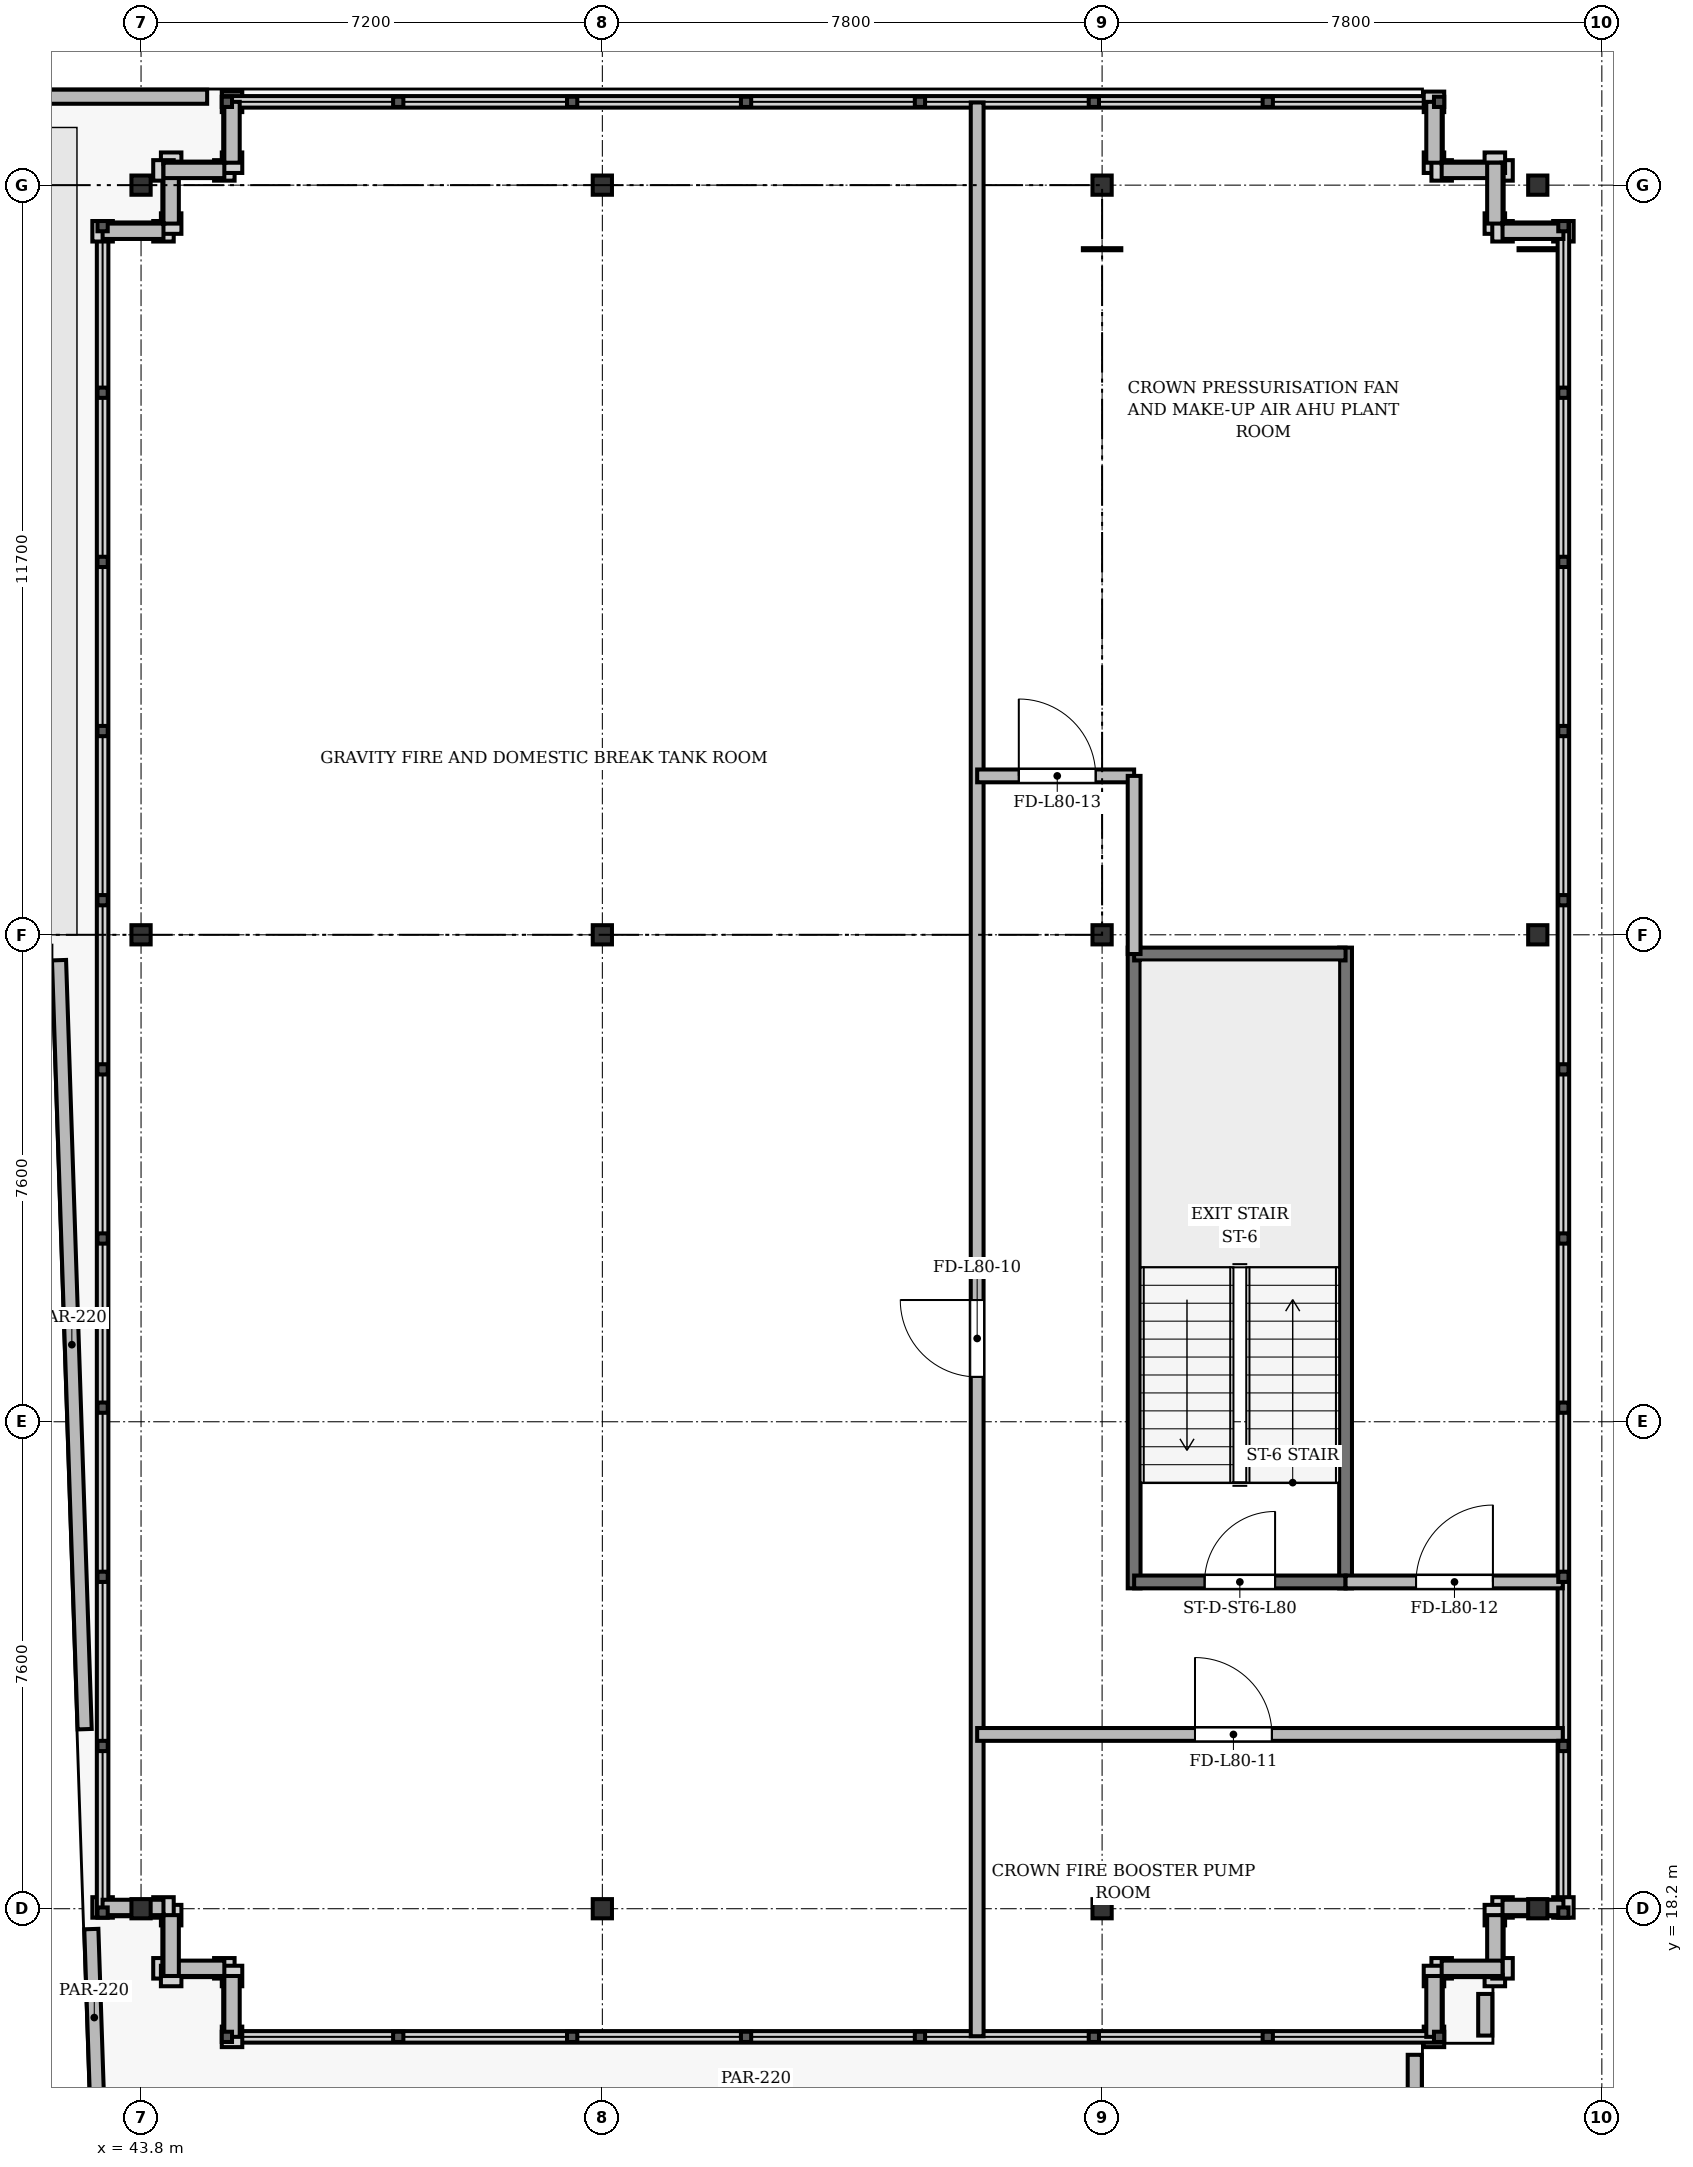
"""IFC4 building model, lengths in metres.
Left out: names, types, materials, properties, quantities, classifications, styles, units other than length and angle.
Written with IfcOpenShell. Run it as: python <this file> out.ifc"""

import sys

from ifc_helpers import new_model, si_unit, direction, frame, frame_2d, origin, origin_2d, place, context, subcontext, project, spatial, rectangle, i_section, extrude, source, transform, mapped, element, fill, save


model = new_model("IFC4")
c1 = context("Model", 3, precision=1e-05, world=origin(), true_north=direction((0.0, 1.0)))
c2 = subcontext(c1, "Body", "Model", "MODEL_VIEW")
j1 = project(units=[si_unit("LENGTHUNIT", "METRE"), si_unit("PLANEANGLEUNIT", "RADIAN")], contexts=[c1])
p1 = place(None, origin())
s1 = spatial("IfcSite", under=j1, at=p1, CompositionType="ELEMENT")
p2 = place(p1, origin())
s2 = spatial("IfcBuilding", under=s1, at=p2, CompositionType="ELEMENT")
p3 = place(p2, frame((0.0, 0.0, 307.9)))
s3 = spatial("IfcBuildingStorey", under=s2, at=p3, CompositionType="ELEMENT", Elevation=307.9)
m1 = source(origin(), c2, "Body", "SweptSolid", [
    extrude(i_section(OverallWidth=0.3, OverallDepth=0.3, WebThickness=0.015, FlangeThickness=0.024, at=origin_2d()), origin(), (0.0, 0.0, 1.0), 4.4),
])
for number, where, z_axis, x_axis in (
    (1, (43.8, 18.2, 0.0), (0.0, 0.0, 1.0), (1.0, 0.0, 0.0)),
    (2, (43.8, 33.4, 0.0), (0.0, 0.0, 1.0), (1.0, 0.0, 0.0)),
    (3, (43.8, 45.1, 0.0), (0.0, 0.0, 1.0), (1.0, 0.0, 0.0)),
    (4, (51.0, 18.2, 0.0), (0.0, 0.0, 1.0), (1.0, 0.0, 0.0)),
    (5, (51.0, 33.4, 0.0), (0.0, 0.0, 1.0), (1.0, 0.0, 0.0)),
    (6, (51.0, 45.1, 0.0), (0.0, 0.0, 1.0), (1.0, 0.0, 0.0)),
    (7, (58.8, 18.2, 0.0), (0.0, 0.0, 1.0), (1.0, 0.0, 0.0)),
    (8, (58.8, 33.4, 0.0), (0.0, 0.0, 1.0), (1.0, 0.0, 0.0)),
    (9, (58.8, 45.1, 0.0), (0.0, 0.0, 1.0), (1.0, 0.0, 0.0)),
    (10, (65.6, 18.2, 0.0), (0.0, 0.0, 1.0), (1.0, 0.0, 0.0)),
    (11, (65.6, 33.4, 0.0), (0.0, 0.0, 1.0), (1.0, 0.0, 0.0)),
    (12, (65.6, 45.1, 0.0), (0.0, 0.0, 1.0), (1.0, 0.0, 0.0)),
):
    element("IfcColumn", number, at=place(p3, frame(where, z_axis=z_axis, x_axis=x_axis)), inside=s3, PredefinedType="COLUMN", context=c2, shape_type="MappedRepresentation", body=[
        mapped(m1, transform((0.0, 0.0, 0.0), x_axis=(1.0, 0.0, 0.0), y_axis=(0.0, 1.0, 0.0), z_axis=(0.0, 0.0, 1.0), scale=1.0)),
    ])
for number, where, z_axis, x_axis in (
    (13, (45.1, 17.27, 0.0), (0.0, 0.0, 1.0), (-1.0, 0.0, 0.0)),
    (14, (44.27, 17.15, 0.0), (0.0, 0.0, 1.0), (0.0, 1.0, 0.0)),
):
    element("IfcWall", number, at=place(p3, frame(where, z_axis=z_axis, x_axis=x_axis)), inside=s3, PredefinedType="SOLIDWALL", context=c2, shape_type="SweptSolid", body=[
        extrude(rectangle(XDim=0.95, YDim=0.24, at=frame_2d((0.475, 0.0))), origin(), (0.0, 0.0, 1.0), 4.1),
    ])
for number, where, z_axis, x_axis in (
    (15, (44.15, 18.22, 0.0), (0.0, 0.0, 1.0), (-1.0, 0.0, 0.0)),
    (16, (43.2, 44.38, 0.0), (0.0, 0.0, 1.0), (1.0, 0.0, 0.0)),
    (17, (44.27, 44.5, 0.0), (0.0, 0.0, 1.0), (0.0, 1.0, 0.0)),
):
    element("IfcWall", number, at=place(p3, frame(where, z_axis=z_axis, x_axis=x_axis)), inside=s3, PredefinedType="SOLIDWALL", context=c2, shape_type="SweptSolid", body=[
        extrude(rectangle(XDim=0.95, YDim=0.24, at=frame_2d((0.475, 0.0))), origin(), (0.0, 0.0, 1.0), 4.1),
    ])
p4 = place(p3, frame((44.15, 45.33, 0.0), z_axis=(0.0, 0.0, 1.0), x_axis=(1.0, 0.0, 0.0)))
e18 = element("IfcWall", 18, at=p4, inside=s3, PredefinedType="SOLIDWALL", context=c2, shape_type="SweptSolid", body=[
    extrude(rectangle(XDim=0.95, YDim=0.24, at=frame_2d((0.475, 0.0))), origin(), (0.0, 0.0, 1.0), 4.1),
])
for number, where, z_axis, x_axis in (
    (19, (45.22, 45.45, 0.0), (0.0, 0.0, 1.0), (0.0, 1.0, 0.0)),
    (20, (63.98, 46.4, 0.0), (0.0, 0.0, 1.0), (0.0, -1.0, 0.0)),
    (21, (64.1, 45.33, 0.0), (0.0, 0.0, 1.0), (1.0, 0.0, 0.0)),
):
    element("IfcWall", number, at=place(p3, frame(where, z_axis=z_axis, x_axis=x_axis)), inside=s3, PredefinedType="SOLIDWALL", context=c2, shape_type="SweptSolid", body=[
        extrude(rectangle(XDim=0.95, YDim=0.24, at=frame_2d((0.475, 0.0))), origin(), (0.0, 0.0, 1.0), 4.1),
    ])
for number, where, z_axis, x_axis in (
    (22, (64.93, 45.45, 0.0), (0.0, 0.0, 1.0), (0.0, -1.0, 0.0)),
    (23, (65.05, 44.38, 0.0), (0.0, 0.0, 1.0), (1.0, 0.0, 0.0)),
    (24, (66.0, 18.22, 0.0), (0.0, 0.0, 1.0), (-1.0, 0.0, 0.0)),
):
    element("IfcWall", number, at=place(p3, frame(where, z_axis=z_axis, x_axis=x_axis)), inside=s3, PredefinedType="SOLIDWALL", context=c2, shape_type="SweptSolid", body=[
        extrude(rectangle(XDim=0.95, YDim=0.24, at=frame_2d((0.475, 0.0))), origin(), (0.0, 0.0, 1.0), 3.6),
    ])
p5 = place(p3, frame((64.93, 18.1, 0.0), z_axis=(0.0, 0.0, 1.0), x_axis=(0.0, -1.0, 0.0)))
e25 = element("IfcWall", 25, at=p5, inside=s3, PredefinedType="SOLIDWALL", context=c2, shape_type="SweptSolid", body=[
    extrude(rectangle(XDim=0.95, YDim=0.24, at=frame_2d((0.475, 0.0))), origin(), (0.0, 0.0, 1.0), 4.1),
])
for number, where, z_axis, x_axis in (
    (26, (65.05, 17.27, 0.0), (0.0, 0.0, 1.0), (-1.0, 0.0, 0.0)),
    (27, (63.98, 17.15, 0.0), (0.0, 0.0, 1.0), (0.0, -1.0, 0.0)),
    (28, (45.22, 16.2, 0.0), (0.0, 0.0, 1.0), (0.0, 1.0, 0.0)),
):
    element("IfcWall", number, at=place(p3, frame(where, z_axis=z_axis, x_axis=x_axis)), inside=s3, PredefinedType="SOLIDWALL", context=c2, shape_type="SweptSolid", body=[
        extrude(rectangle(XDim=0.95, YDim=0.24, at=frame_2d((0.475, 0.0))), origin(), (0.0, 0.0, 1.0), 4.1),
    ])
p6 = place(p3, frame((29.568, 46.48, 0.0), z_axis=(0.0, 0.0, 1.0), x_axis=(1.0, 0.0, 0.0)))
e29 = element("IfcWall", 29, at=p6, inside=s3, PredefinedType="PARAPET", context=c2, shape_type="SweptSolid", body=[
    extrude(rectangle(XDim=15.263, YDim=0.22, at=frame_2d((7.632, 0.0))), origin(), (0.0, 0.0, 1.0), 1.08),
])
p7 = place(p3, frame((63.68, 15.92, 0.0), z_axis=(0.0, 0.0, 1.0), x_axis=(0.0, -1.0, 0.0)))
e30 = element("IfcWall", 30, at=p7, inside=s3, PredefinedType="PARAPET", context=c2, shape_type="SweptSolid", body=[
    extrude(rectangle(XDim=0.8, YDim=0.22, at=frame_2d((0.4, 0.0))), origin(), (0.0, 0.0, 1.0), 1.08),
])
p8 = place(p3, frame((43.116, 15.12, 0.0), z_axis=(0.0, 0.0, 1.0), x_axis=(-0.033391303709, 0.999442354934, 0.0)))
e31 = element("IfcWall", 31, at=p8, inside=s3, PredefinedType="PARAPET", context=c2, shape_type="SweptSolid", body=[
    extrude(rectangle(XDim=2.764, YDim=0.22, at=frame_2d((1.382, 0.0))), origin(), (0.0, 0.0, 1.0), 1.08),
])
p9 = place(p3, frame((42.92, 21.002, 0.0), z_axis=(0.0, 0.0, 1.0), x_axis=(-0.033301291633, 0.999445358174, 0.0)))
e32 = element("IfcWall", 32, at=p9, inside=s3, PredefinedType="PARAPET", context=c2, shape_type="SweptSolid", body=[
    extrude(rectangle(XDim=12.009, YDim=0.22, at=frame_2d((6.004, 0.0))), origin(), (0.0, 0.0, 1.0), 1.08),
])
p10 = place(p3, frame((64.78, 16.87, 0.0), z_axis=(0.0, 0.0, 1.0), x_axis=(0.0, -1.0, 0.0)))
e33 = element("IfcWall", 33, at=p10, inside=s3, PredefinedType="PARAPET", context=c2, shape_type="SweptSolid", body=[
    extrude(rectangle(XDim=0.65, YDim=0.22, at=frame_2d((0.325, 0.0))), origin(), (0.0, 0.0, 1.0), 1.08),
])
for number, where, z_axis, x_axis in (
    (34, (59.3, 23.2, 0.0), (0.0, 0.0, 1.0), (0.0, 1.0, 0.0)),
    (35, (62.6, 23.2, 0.0), (0.0, 0.0, 1.0), (0.0, 1.0, 0.0)),
):
    element("IfcWall", number, at=place(p3, frame(where, z_axis=z_axis, x_axis=x_axis)), inside=s3, PredefinedType="SHEAR", context=c2, shape_type="SweptSolid", body=[
        extrude(rectangle(XDim=10.0, YDim=0.2, at=frame_2d((5.0, 0.0))), origin(), (0.0, 0.0, 1.0), 4.1),
    ])
p11 = place(p3, frame((59.3, 33.1, 0.0), z_axis=(0.0, 0.0, 1.0), x_axis=(1.0, 0.0, 0.0)))
e36 = element("IfcWall", 36, at=p11, inside=s3, PredefinedType="SHEAR", context=c2, shape_type="SweptSolid", body=[
    extrude(rectangle(XDim=3.3, YDim=0.2, at=frame_2d((1.65, 0.0))), origin(), (0.0, 0.0, 1.0), 4.1),
])
p12 = place(p3, frame((59.3, 23.3, 0.0), z_axis=(0.0, 0.0, 1.0), x_axis=(1.0, 0.0, 0.0)))
e37 = element("IfcWall", 37, at=p12, inside=s3, PredefinedType="SHEAR", context=c2, shape_type="SweptSolid", body=[
    extrude(rectangle(XDim=3.3, YDim=0.2, at=frame_2d((1.65, 0.0))), origin(), (0.0, 0.0, 1.0), 4.1),
])
p13 = place(p12, frame((1.1, 0.0, 0.0)))
e38 = element("IfcOpeningElement", 38, at=p13, cuts=e37, PredefinedType="OPENING", context=c2, shape_type="SweptSolid", body=[
    extrude(rectangle(XDim=1.1, YDim=2.15, at=frame_2d((0.55, 1.075))), frame((0.0, 0.11, 0.0), z_axis=(0.0, -1.0, 0.0), x_axis=(1.0, 0.0, 0.0)), (0.0, 0.0, 1.0), 0.22),
])
p14 = place(p3, frame((56.85, 16.21, 0.0), z_axis=(0.0, 0.0, 1.0), x_axis=(0.0, 1.0, 0.0)))
e39 = element("IfcWall", 39, at=p14, inside=s3, PredefinedType="PARTITIONING", context=c2, shape_type="SweptSolid", body=[
    extrude(rectangle(XDim=30.18, YDim=0.2, at=frame_2d((15.09, 0.0))), origin(), (0.0, 0.0, 1.0), 3.6),
])
p15 = place(p14, frame((10.29, 0.0, 0.0)))
e40 = element("IfcOpeningElement", 40, at=p15, cuts=e39, PredefinedType="OPENING", context=c2, shape_type="SweptSolid", body=[
    extrude(rectangle(XDim=1.2, YDim=2.15, at=frame_2d((0.6, 1.075))), frame((0.0, 0.11, 0.0), z_axis=(0.0, -1.0, 0.0), x_axis=(1.0, 0.0, 0.0)), (0.0, 0.0, 1.0), 0.22),
])
p16 = place(p3, frame((56.85, 20.92, 0.0), z_axis=(0.0, 0.0, 1.0), x_axis=(1.0, 0.0, 0.0)))
e41 = element("IfcWall", 41, at=p16, inside=s3, PredefinedType="PARTITIONING", context=c2, shape_type="SweptSolid", body=[
    extrude(rectangle(XDim=9.14, YDim=0.2, at=frame_2d((4.57, 0.0))), origin(), (0.0, 0.0, 1.0), 3.6),
])
p17 = place(p16, frame((3.4, 0.0, 0.0)))
e42 = element("IfcOpeningElement", 42, at=p17, cuts=e41, PredefinedType="OPENING", context=c2, shape_type="SweptSolid", body=[
    extrude(rectangle(XDim=1.2, YDim=2.15, at=frame_2d((0.6, 1.075))), frame((0.0, 0.11, 0.0), z_axis=(0.0, -1.0, 0.0), x_axis=(1.0, 0.0, 0.0)), (0.0, 0.0, 1.0), 0.22),
])
p18 = place(p3, frame((62.6, 23.3, 0.0), z_axis=(0.0, 0.0, 1.0), x_axis=(1.0, 0.0, 0.0)))
e43 = element("IfcWall", 43, at=p18, inside=s3, PredefinedType="PARTITIONING", context=c2, shape_type="SweptSolid", body=[
    extrude(rectangle(XDim=3.39, YDim=0.2, at=frame_2d((1.695, 0.0))), origin(), (0.0, 0.0, 1.0), 3.6),
])
p19 = place(p18, frame((1.1, 0.0, 0.0)))
e44 = element("IfcOpeningElement", 44, at=p19, cuts=e43, PredefinedType="OPENING", context=c2, shape_type="SweptSolid", body=[
    extrude(rectangle(XDim=1.2, YDim=2.15, at=frame_2d((0.6, 1.075))), frame((0.0, 0.11, 0.0), z_axis=(0.0, -1.0, 0.0), x_axis=(1.0, 0.0, 0.0)), (0.0, 0.0, 1.0), 0.22),
])
p20 = place(p3, frame((56.85, 35.88, 0.0), z_axis=(0.0, 0.0, 1.0), x_axis=(1.0, 0.0, 0.0)))
e45 = element("IfcWall", 45, at=p20, inside=s3, PredefinedType="PARTITIONING", context=c2, shape_type="SweptSolid", body=[
    extrude(rectangle(XDim=2.45, YDim=0.2, at=frame_2d((1.225, 0.0))), origin(), (0.0, 0.0, 1.0), 3.6),
])
p21 = place(p20, frame((0.65, 0.0, 0.0)))
e46 = element("IfcOpeningElement", 46, at=p21, cuts=e45, PredefinedType="OPENING", context=c2, shape_type="SweptSolid", body=[
    extrude(rectangle(XDim=1.2, YDim=2.15, at=frame_2d((0.6, 1.075))), frame((0.0, 0.11, 0.0), z_axis=(0.0, -1.0, 0.0), x_axis=(1.0, 0.0, 0.0)), (0.0, 0.0, 1.0), 0.22),
])
p22 = place(p3, frame((59.3, 33.1, 0.0), z_axis=(0.0, 0.0, 1.0), x_axis=(0.0, 1.0, 0.0)))
e47 = element("IfcWall", 47, at=p22, inside=s3, PredefinedType="PARTITIONING", context=c2, shape_type="SweptSolid", body=[
    extrude(rectangle(XDim=2.78, YDim=0.2, at=frame_2d((1.39, 0.0))), origin(), (0.0, 0.0, 1.0), 3.6),
])
m2 = source(origin(), c2, "Body", "SweptSolid", [
    extrude(rectangle(XDim=1.1, YDim=2.15, at=frame_2d((0.55, 1.075))), frame((0.0, 0.025, 0.0), z_axis=(0.0, -1.0, 0.0), x_axis=(1.0, 0.0, 0.0)), (0.0, 0.0, 1.0), 0.05),
])
p23 = place(p13, origin())
e48 = element("IfcDoor", 48, at=p23, inside=s3, OperationType="SINGLE_SWING_RIGHT", PredefinedType="DOOR", context=c2, shape_type="MappedRepresentation", body=[
    mapped(m2, transform((0.0, 0.0, 0.0), x_axis=(1.0, 0.0, 0.0), y_axis=(0.0, 1.0, 0.0), z_axis=(0.0, 0.0, 1.0), scale=1.0)),
])
fill(e38, e48)
m3 = source(origin(), c2, "Body", "SweptSolid", [
    extrude(rectangle(XDim=1.2, YDim=2.15, at=frame_2d((0.6, 1.075))), frame((0.0, 0.025, 0.0), z_axis=(0.0, -1.0, 0.0), x_axis=(1.0, 0.0, 0.0)), (0.0, 0.0, 1.0), 0.05),
])
p24 = place(p15, origin())
e49 = element("IfcDoor", 49, at=p24, inside=s3, OperationType="SINGLE_SWING_RIGHT", PredefinedType="DOOR", context=c2, shape_type="MappedRepresentation", body=[
    mapped(m3, transform((0.0, 0.0, 0.0), x_axis=(1.0, 0.0, 0.0), y_axis=(0.0, 1.0, 0.0), z_axis=(0.0, 0.0, 1.0), scale=1.0)),
])
fill(e40, e49)
p25 = place(p17, origin())
e50 = element("IfcDoor", 50, at=p25, inside=s3, OperationType="SINGLE_SWING_LEFT", PredefinedType="DOOR", context=c2, shape_type="MappedRepresentation", body=[
    mapped(m3, transform((0.0, 0.0, 0.0), x_axis=(1.0, 0.0, 0.0), y_axis=(0.0, 1.0, 0.0), z_axis=(0.0, 0.0, 1.0), scale=1.0)),
])
fill(e42, e50)
p26 = place(p19, origin())
e51 = element("IfcDoor", 51, at=p26, inside=s3, OperationType="SINGLE_SWING_RIGHT", PredefinedType="DOOR", context=c2, shape_type="MappedRepresentation", body=[
    mapped(m3, transform((0.0, 0.0, 0.0), x_axis=(1.0, 0.0, 0.0), y_axis=(0.0, 1.0, 0.0), z_axis=(0.0, 0.0, 1.0), scale=1.0)),
])
fill(e44, e51)
p27 = place(p21, origin())
e52 = element("IfcDoor", 52, at=p27, inside=s3, OperationType="SINGLE_SWING_LEFT", PredefinedType="DOOR", context=c2, shape_type="MappedRepresentation", body=[
    mapped(m3, transform((0.0, 0.0, 0.0), x_axis=(1.0, 0.0, 0.0), y_axis=(0.0, 1.0, 0.0), z_axis=(0.0, 0.0, 1.0), scale=1.0)),
])
fill(e46, e52)
save(model, sys.argv[1])
